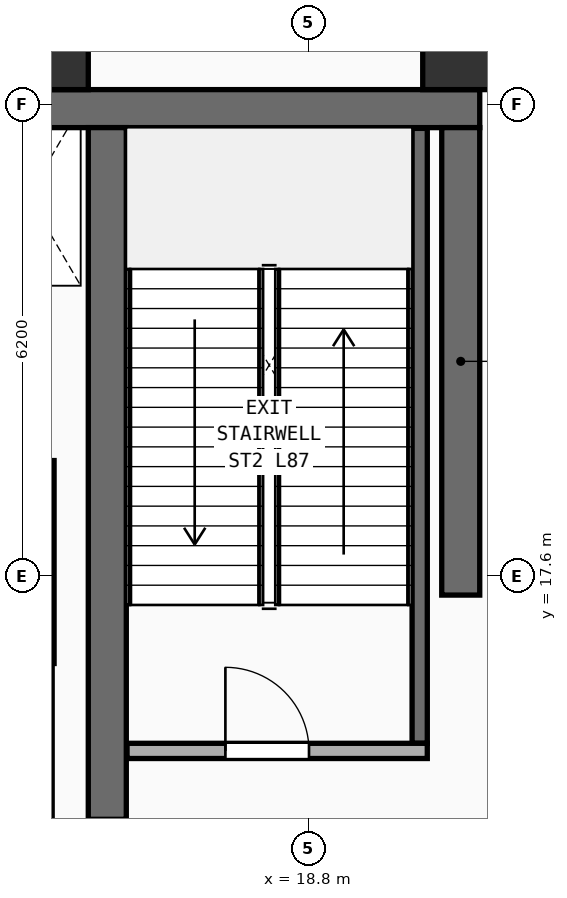
"""IFC4 building model, lengths in metres.
Left out: names, types, materials, properties, quantities, classifications, styles, units other than length and angle.
Written with IfcOpenShell. Run it as: python <this file> out.ifc"""

import sys

from ifc_helpers import new_model, si_unit, direction, frame, frame_2d, origin, origin_2d, place, context, subcontext, project, spatial, rectangle, extrude, element, fill, save


model = new_model("IFC4")
c1 = context("Model", 3, precision=1e-05, world=origin(), true_north=direction((0.0, 1.0)))
c2 = subcontext(c1, "Body", "Model", "MODEL_VIEW")
j1 = project(units=[si_unit("LENGTHUNIT", "METRE"), si_unit("PLANEANGLEUNIT", "RADIAN")], contexts=[c1])
p1 = place(None, origin())
s1 = spatial("IfcSite", under=j1, at=p1, CompositionType="ELEMENT")
p2 = place(p1, origin())
s2 = spatial("IfcBuilding", under=s1, at=p2, CompositionType="ELEMENT")
p3 = place(p2, frame((0.0, 0.0, 338.8)))
s3 = spatial("IfcBuildingStorey", under=s2, at=p3, CompositionType="ELEMENT", Elevation=338.8)
p4 = place(p3, frame((7.2, 23.75, 0.0), z_axis=(0.0, 0.0, 1.0), x_axis=(1.0, 0.0, 0.0)))
e1 = element("IfcWall", 1, at=p4, inside=s3, PredefinedType="SHEAR", context=c2, shape_type="SweptSolid", body=[
    extrude(rectangle(XDim=13.85, YDim=0.5, at=frame_2d((6.925, 0.0))), origin(), (0.0, 0.0, 1.0), 5.02),
])
p5 = place(p3, frame((20.8, 17.35, 0.0), z_axis=(0.0, 0.0, 1.0), x_axis=(0.0, 1.0, 0.0)))
e2 = element("IfcWall", 2, at=p5, inside=s3, PredefinedType="SHEAR", context=c2, shape_type="SweptSolid", body=[
    extrude(rectangle(XDim=6.15, YDim=0.5, at=frame_2d((3.075, 0.0))), origin(), (0.0, 0.0, 1.0), 5.02),
])
p6 = place(p3, frame((16.15, 14.4, 0.0), z_axis=(0.0, 0.0, 1.0), x_axis=(0.0, 1.0, 0.0)))
e3 = element("IfcWall", 3, at=p6, inside=s3, PredefinedType="SHEAR", context=c2, shape_type="SweptSolid", body=[
    extrude(rectangle(XDim=9.1, YDim=0.5, at=frame_2d((4.55, 0.0))), origin(), (0.0, 0.0, 1.0), 5.02),
])
for number, where, z_axis, x_axis in (
    (4, (15.45, 24.45, 0.0), (0.0, 0.0, 1.0), (1.0, 0.0, 0.0)),
    (5, (20.75, 24.45, 0.0), (0.0, 0.0, 1.0), (1.0, 0.0, 0.0)),
):
    element("IfcColumn", number, at=place(p3, frame(where, z_axis=z_axis, x_axis=x_axis)), inside=s3, PredefinedType="COLUMN", context=c2, shape_type="SweptSolid", body=[
        extrude(rectangle(XDim=0.9, YDim=0.9, at=origin_2d()), origin(), (0.0, 0.0, 1.0), 5.02),
    ])
p7 = place(p3, frame((27.585, 19.375, 0.0), z_axis=(0.0, 0.0, 1.0), x_axis=(-0.707106781187, 0.707106781187, 0.0)))
e6 = element("IfcWall", 6, at=p7, inside=s3, PredefinedType="SOLIDWALL", context=c2, shape_type="SweptSolid", body=[
    extrude(rectangle(XDim=9.207, YDim=0.28, at=frame_2d((4.603, 0.0))), origin(), (0.0, 0.0, 1.0), 5.02),
])
p8 = place(p3, frame((20.26, 15.4, 0.0), z_axis=(0.0, 0.0, 1.0), x_axis=(0.0, 1.0, 0.0)))
e7 = element("IfcWall", 7, at=p8, inside=s3, PredefinedType="SHEAR", context=c2, shape_type="SweptSolid", body=[
    extrude(rectangle(XDim=8.09, YDim=0.2, at=frame_2d((4.045, 0.0))), origin(), (0.0, 0.0, 1.0), 5.02),
])
p9 = place(p3, frame((16.41, 15.3, 0.0), z_axis=(0.0, 0.0, 1.0), x_axis=(1.0, 0.0, 0.0)))
e8 = element("IfcWall", 8, at=p9, inside=s3, PredefinedType="PARTITIONING", context=c2, shape_type="SweptSolid", body=[
    extrude(rectangle(XDim=3.95, YDim=0.2, at=frame_2d((1.975, 0.0))), origin(), (0.0, 0.0, 1.0), 5.02),
])
p10 = place(p9, frame((1.294, 0.0, 0.0)))
e9 = element("IfcOpeningElement", 9, at=p10, cuts=e8, PredefinedType="OPENING", context=c2, shape_type="SweptSolid", body=[
    extrude(rectangle(XDim=1.1, YDim=2.2, at=frame_2d((0.55, 1.1))), frame((0.0, 0.11, 0.0), z_axis=(0.0, -1.0, 0.0), x_axis=(1.0, 0.0, 0.0)), (0.0, 0.0, 1.0), 0.22),
])
p11 = place(p3, frame((15.35, 14.22, 0.0), z_axis=(0.0, 0.0, 1.0), x_axis=(0.0, 1.0, 0.0)))
e10 = element("IfcWall", 10, at=p11, inside=s3, PredefinedType="PARTITIONING", context=c2, shape_type="SweptSolid", body=[
    extrude(rectangle(XDim=2.23, YDim=0.15, at=frame_2d((1.115, 0.0))), origin(), (0.0, 0.0, 1.0), 5.02),
])
p12 = place(p3, frame((15.35, 16.45, 0.0), z_axis=(0.0, 0.0, 1.0), x_axis=(0.0, 1.0, 0.0)))
e11 = element("IfcWall", 11, at=p12, inside=s3, PredefinedType="PARTITIONING", context=c2, shape_type="SweptSolid", body=[
    extrude(rectangle(XDim=2.67, YDim=0.2, at=frame_2d((1.335, 0.0))), origin(), (0.0, 0.0, 1.0), 5.02),
])
p13 = place(p10, origin())
e12 = element("IfcDoor", 12, at=p13, inside=s3, OperationType="SINGLE_SWING_LEFT", PredefinedType="DOOR", context=c2, shape_type="SweptSolid", body=[
    extrude(rectangle(XDim=1.1, YDim=2.2, at=frame_2d((0.55, 1.1))), frame((0.0, 0.025, 0.0), z_axis=(0.0, -1.0, 0.0), x_axis=(1.0, 0.0, 0.0)), (0.0, 0.0, 1.0), 0.05),
])
fill(e9, e12)
save(model, sys.argv[1])
